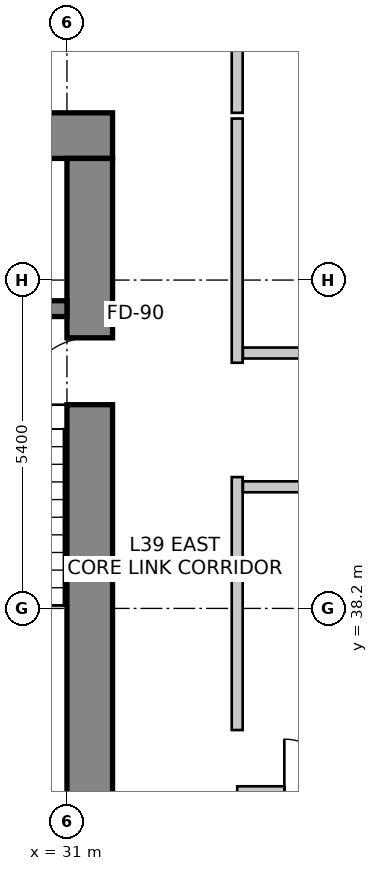
"""IFC4 building model, lengths in metres.
Left out: names, types, materials, properties, quantities, classifications, styles, units other than length and angle.
Written with IfcOpenShell. Run it as: python <this file> out.ifc"""

import sys

from ifc_helpers import new_model, si_unit, direction, frame, frame_2d, origin, place, context, subcontext, project, spatial, rectangle, extrude, source, transform, mapped, element, fill, save


model = new_model("IFC4")
c1 = context("Model", 3, precision=1e-05, world=origin(), true_north=direction((0.0, 1.0)))
c2 = subcontext(c1, "Body", "Model", "MODEL_VIEW")
j1 = project(units=[si_unit("LENGTHUNIT", "METRE"), si_unit("PLANEANGLEUNIT", "RADIAN")], contexts=[c1])
p1 = place(None, origin())
s1 = spatial("IfcSite", under=j1, at=p1, CompositionType="ELEMENT")
p2 = place(p1, origin())
s2 = spatial("IfcBuilding", under=s1, at=p2, CompositionType="ELEMENT")
p3 = place(p2, frame((0.0, 0.0, 157.4)))
s3 = spatial("IfcBuildingStorey", under=s2, at=p3, CompositionType="ELEMENT", Elevation=157.4)
p4 = place(p3, frame((15.85, 45.975, 0.0), z_axis=(0.0, 0.0, 1.0), x_axis=(1.0, 0.0, 0.0)))
e1 = element("IfcWall", 1, at=p4, inside=s3, PredefinedType="SHEAR", context=c2, shape_type="SweptSolid", body=[
    extrude(rectangle(XDim=15.9, YDim=0.75, at=frame_2d((7.95, 0.0))), origin(), (0.0, 0.0, 1.0), 3.6),
])
p5 = place(p3, frame((31.375, 34.2, 0.0), z_axis=(0.0, 0.0, 1.0), x_axis=(0.0, 1.0, 0.0)))
e2 = element("IfcWall", 2, at=p5, inside=s3, PredefinedType="SHEAR", context=c2, shape_type="SweptSolid", body=[
    extrude(rectangle(XDim=11.4, YDim=0.75, at=frame_2d((5.7, 0.0))), origin(), (0.0, 0.0, 1.0), 3.6),
])
m1 = source(origin(), c2, "Body", "SweptSolid", [
    extrude(rectangle(XDim=1.1, YDim=2.15, at=frame_2d((0.55, 1.075))), frame((0.0, 0.385, 0.0), z_axis=(0.0, -1.0, 0.0), x_axis=(1.0, 0.0, 0.0)), (0.0, 0.0, 1.0), 0.77),
])
p6 = place(p5, frame((7.35, 0.0, 0.0)))
e3 = element("IfcOpeningElement", 3, at=p6, cuts=e2, PredefinedType="OPENING", context=c2, shape_type="MappedRepresentation", body=[
    mapped(m1, transform((0.0, 0.0, 0.0), scale=1.0)),
])
p7 = place(p3, frame((27.5, 43.13, 0.0), z_axis=(0.0, 0.0, 1.0), x_axis=(1.0, 0.0, 0.0)))
e4 = element("IfcWall", 4, at=p7, inside=s3, PredefinedType="SHEAR", context=c2, shape_type="SweptSolid", body=[
    extrude(rectangle(XDim=3.5, YDim=0.26, at=frame_2d((1.75, 0.0))), origin(), (0.0, 0.0, 1.0), 3.6),
])
p8 = place(p3, frame((53.561, 47.48, 0.0), z_axis=(0.0, 0.0, 1.0), x_axis=(-0.985845173895, 0.167658262868, 0.0)))
e5 = element("IfcWall", 5, at=p8, inside=s3, PredefinedType="SOLIDWALL", context=c2, shape_type="SweptSolid", body=[
    extrude(rectangle(XDim=32.132, YDim=0.3, at=frame_2d((16.066, 0.0))), origin(), (0.0, 0.0, 1.0), 3.35),
])
m2 = source(origin(), c2, "Body", "SweptSolid", [
    extrude(rectangle(XDim=2.1, YDim=2.0, at=frame_2d((1.05, 1.0))), frame((0.0, 0.16, 0.0), z_axis=(0.0, -1.0, 0.0), x_axis=(1.0, 0.0, 0.0)), (0.0, 0.0, 1.0), 0.32),
])
p9 = place(p8, frame((1.032, 0.0, 0.85)))
e6 = element("IfcOpeningElement", 6, at=p9, cuts=e5, PredefinedType="OPENING", context=c2, shape_type="MappedRepresentation", body=[
    mapped(m2, transform((0.0, 0.0, 0.0), scale=1.0)),
])
p10 = place(p8, frame((5.787, 0.0, 0.85)))
e7 = element("IfcOpeningElement", 7, at=p10, cuts=e5, PredefinedType="OPENING", context=c2, shape_type="MappedRepresentation", body=[
    mapped(m2, transform((0.0, 0.0, 0.0), scale=1.0)),
])
m3 = source(origin(), c2, "Body", "SweptSolid", [
    extrude(rectangle(XDim=1.5, YDim=1.8, at=frame_2d((0.75, 0.9))), frame((0.0, 0.16, 0.0), z_axis=(0.0, -1.0, 0.0), x_axis=(1.0, 0.0, 0.0)), (0.0, 0.0, 1.0), 0.32),
])
p11 = place(p8, frame((10.078, 0.0, 0.85)))
e8 = element("IfcOpeningElement", 8, at=p11, cuts=e5, PredefinedType="OPENING", context=c2, shape_type="MappedRepresentation", body=[
    mapped(m3, transform((0.0, 0.0, 0.0), scale=1.0)),
])
p12 = place(p8, frame((13.768, 0.0, 0.85)))
e9 = element("IfcOpeningElement", 9, at=p12, cuts=e5, PredefinedType="OPENING", context=c2, shape_type="MappedRepresentation", body=[
    mapped(m2, transform((0.0, 0.0, 0.0), scale=1.0)),
])
p13 = place(p8, frame((18.039, 0.0, 0.85)))
e10 = element("IfcOpeningElement", 10, at=p13, cuts=e5, PredefinedType="OPENING", context=c2, shape_type="MappedRepresentation", body=[
    mapped(m3, transform((0.0, 0.0, 0.0), scale=1.0)),
])
p14 = place(p8, frame((20.459, 0.0, 0.85)))
e11 = element("IfcOpeningElement", 11, at=p14, cuts=e5, PredefinedType="OPENING", context=c2, shape_type="MappedRepresentation", body=[
    mapped(m2, transform((0.0, 0.0, 0.0), scale=1.0)),
])
p15 = place(p8, frame((25.55, 0.0, 0.85)))
e12 = element("IfcOpeningElement", 12, at=p15, cuts=e5, PredefinedType="OPENING", context=c2, shape_type="MappedRepresentation", body=[
    mapped(m2, transform((0.0, 0.0, 0.0), scale=1.0)),
])
m4 = source(origin(), c2, "Body", "SweptSolid", [
    extrude(rectangle(XDim=0.9, YDim=1.6, at=frame_2d((0.45, 0.8))), frame((0.0, 0.16, 0.0), z_axis=(0.0, -1.0, 0.0), x_axis=(1.0, 0.0, 0.0)), (0.0, 0.0, 1.0), 0.32),
])
p16 = place(p8, frame((30.65, 0.0, 0.85)))
e13 = element("IfcOpeningElement", 13, at=p16, cuts=e5, PredefinedType="OPENING", context=c2, shape_type="MappedRepresentation", body=[
    mapped(m4, transform((0.0, 0.0, 0.0), scale=1.0)),
])
p17 = place(p3, frame((33.8, 48.5, 0.0), z_axis=(0.0, 0.0, 1.0), x_axis=(0.0, -1.0, 0.0)))
e14 = element("IfcWall", 14, at=p17, inside=s3, PredefinedType="PARTITIONING", context=c2, shape_type="SweptSolid", body=[
    extrude(rectangle(XDim=2.15, YDim=0.18, at=frame_2d((1.075, 0.0))), origin(), (0.0, 0.0, 1.0), 2.492),
])
p18 = place(p3, frame((33.8, 46.256, 0.0), z_axis=(0.0, 0.0, 1.0), x_axis=(0.0, -1.0, 0.0)))
e15 = element("IfcWall", 15, at=p18, inside=s3, PredefinedType="PARTITIONING", context=c2, shape_type="SweptSolid", body=[
    extrude(rectangle(XDim=4.016, YDim=0.18, at=frame_2d((2.008, 0.0))), origin(), (0.0, 0.0, 1.0), 2.788),
])
p19 = place(p3, frame((33.8, 40.36, 0.0), z_axis=(0.0, 0.0, 1.0), x_axis=(0.0, -1.0, 0.0)))
e16 = element("IfcWall", 16, at=p19, inside=s3, PredefinedType="PARTITIONING", context=c2, shape_type="SweptSolid", body=[
    extrude(rectangle(XDim=4.16, YDim=0.18, at=frame_2d((2.08, 0.0))), origin(), (0.0, 0.0, 1.0), 3.35),
])
p20 = place(p3, frame((33.894, 42.4, 0.0), z_axis=(0.0, 0.0, 1.0), x_axis=(1.0, 0.0, 0.0)))
e17 = element("IfcWall", 17, at=p20, inside=s3, PredefinedType="PARTITIONING", context=c2, shape_type="SweptSolid", body=[
    extrude(rectangle(XDim=7.933, YDim=0.18, at=frame_2d((3.966, 0.0))), origin(), (0.0, 0.0, 1.0), 2.788),
])
m5 = source(origin(), c2, "Body", "SweptSolid", [
    extrude(rectangle(XDim=0.9, YDim=2.15, at=frame_2d((0.45, 1.075))), frame((0.0, 0.1, 0.0), z_axis=(0.0, -1.0, 0.0), x_axis=(1.0, 0.0, 0.0)), (0.0, 0.0, 1.0), 0.2),
])
p21 = place(p20, frame((2.723, 0.0, 0.0)))
e18 = element("IfcOpeningElement", 18, at=p21, cuts=e17, PredefinedType="OPENING", context=c2, shape_type="MappedRepresentation", body=[
    mapped(m5, transform((0.0, 0.0, 0.0), scale=1.0)),
])
p22 = place(p3, frame((41.827, 40.2, 0.0), z_axis=(0.0, 0.0, 1.0), x_axis=(-1.0, 0.0, 0.0)))
e19 = element("IfcWall", 19, at=p22, inside=s3, PredefinedType="PARTITIONING", context=c2, shape_type="SweptSolid", body=[
    extrude(rectangle(XDim=7.933, YDim=0.18, at=frame_2d((3.966, 0.0))), origin(), (0.0, 0.0, 1.0), 2.788),
])
p23 = place(p22, frame((4.799, 0.0, 0.0)))
e20 = element("IfcOpeningElement", 20, at=p23, cuts=e19, PredefinedType="OPENING", context=c2, shape_type="MappedRepresentation", body=[
    mapped(m5, transform((0.0, 0.0, 0.0), scale=1.0)),
])
p24 = place(p3, frame((33.8, 35.2, 0.0), z_axis=(0.0, 0.0, 1.0), x_axis=(1.0, 0.0, 0.0)))
e21 = element("IfcWall", 21, at=p24, inside=s3, PredefinedType="PARTITIONING", context=c2, shape_type="SweptSolid", body=[
    extrude(rectangle(XDim=2.4, YDim=0.15, at=frame_2d((1.2, 0.0))), origin(), (0.0, 0.0, 1.0), 3.35),
])
m6 = source(origin(), c2, "Body", "SweptSolid", [
    extrude(rectangle(XDim=0.85, YDim=2.15, at=frame_2d((0.425, 1.075))), frame((0.0, 0.085, 0.0), z_axis=(0.0, -1.0, 0.0), x_axis=(1.0, 0.0, 0.0)), (0.0, 0.0, 1.0), 0.17),
])
p25 = place(p24, frame((0.775, 0.0, 0.0)))
e22 = element("IfcOpeningElement", 22, at=p25, cuts=e21, PredefinedType="OPENING", context=c2, shape_type="MappedRepresentation", body=[
    mapped(m6, transform((0.0, 0.0, 0.0), scale=1.0)),
])
m7 = source(origin(), c2, "Body", "SweptSolid", [
    extrude(rectangle(XDim=1.1, YDim=2.15, at=frame_2d((0.55, 1.075))), frame((0.0, 0.025, 0.0), z_axis=(0.0, -1.0, 0.0), x_axis=(1.0, 0.0, 0.0)), (0.0, 0.0, 1.0), 0.05),
])
p26 = place(p6, origin())
e23 = element("IfcDoor", 23, at=p26, inside=s3, OperationType="SINGLE_SWING_LEFT", PredefinedType="DOOR", context=c2, shape_type="MappedRepresentation", body=[
    mapped(m7, transform((0.0, 0.0, 0.0), scale=1.0)),
])
fill(e3, e23)
m8 = source(origin(), c2, "Body", "SweptSolid", [
    extrude(rectangle(XDim=0.85, YDim=2.15, at=frame_2d((0.425, 1.075))), frame((0.0, 0.025, 0.0), z_axis=(0.0, -1.0, 0.0), x_axis=(1.0, 0.0, 0.0)), (0.0, 0.0, 1.0), 0.05),
])
p27 = place(p25, origin())
e24 = element("IfcDoor", 24, at=p27, inside=s3, OperationType="SINGLE_SWING_LEFT", PredefinedType="DOOR", context=c2, shape_type="MappedRepresentation", body=[
    mapped(m8, transform((0.0, 0.0, 0.0), scale=1.0)),
])
fill(e22, e24)
save(model, sys.argv[1])
